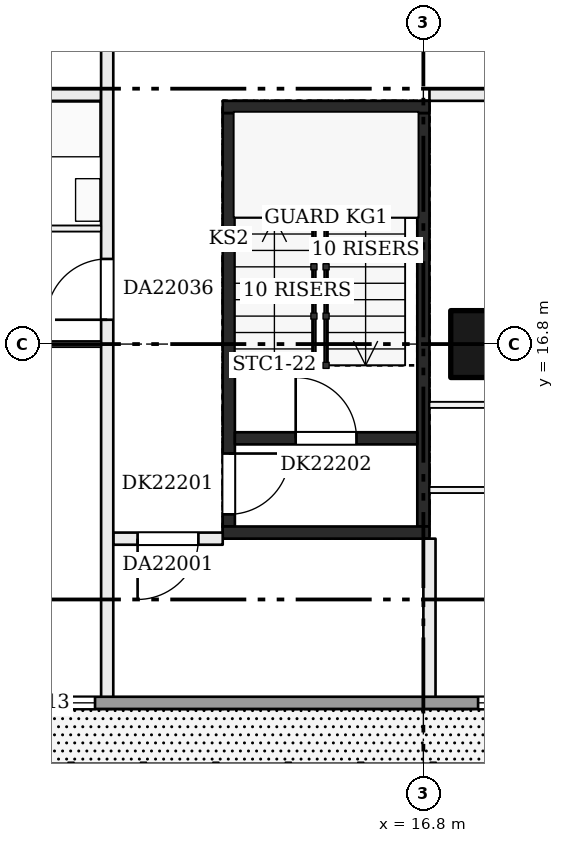
"""IFC4 building model, lengths in metres.
Left out: names, types, materials, properties, quantities, classifications, styles, units other than length and angle.
Written with IfcOpenShell. Run it as: python <this file> out.ifc"""

import sys

from ifc_helpers import new_model, si_unit, direction, frame, frame_2d, origin, origin_2d, place, context, subcontext, project, spatial, rectangle, extrude, element, fill, save


model = new_model("IFC4")
c1 = context("Model", 3, precision=1e-05, world=origin(), true_north=direction((0.0, 1.0)))
c2 = subcontext(c1, "Body", "Model", "MODEL_VIEW")
j1 = project(units=[si_unit("LENGTHUNIT", "METRE"), si_unit("PLANEANGLEUNIT", "RADIAN")], contexts=[c1])
p1 = place(None, origin())
s1 = spatial("IfcSite", under=j1, at=p1, CompositionType="ELEMENT")
p2 = place(p1, origin())
s2 = spatial("IfcBuilding", under=s1, at=p2, CompositionType="ELEMENT")
p3 = place(p2, frame((0.0, 0.0, 91.7)))
s3 = spatial("IfcBuildingStorey", under=s2, at=p3, CompositionType="ELEMENT", Elevation=91.7)
p4 = place(p3, frame((17.8, 16.8, 0.0), z_axis=(0.0, 0.0, 1.0), x_axis=(1.0, 0.0, 0.0)))
e1 = element("IfcColumn", 1, at=p4, inside=s3, PredefinedType="COLUMN", context=c2, shape_type="SweptSolid", body=[
    extrude(rectangle(XDim=1.1, YDim=1.1, at=origin_2d()), origin(), (0.0, 0.0, 1.0), 3.22),
])
p5 = place(p3, frame((13.6, 13.8, 0.0), z_axis=(0.0, 0.0, 1.0), x_axis=(0.0, 1.0, 0.0)))
e2 = element("IfcWall", 2, at=p5, inside=s3, PredefinedType="SHEAR", context=c2, shape_type="SweptSolid", body=[
    extrude(rectangle(XDim=6.8, YDim=0.2, at=frame_2d((3.4, 0.0))), origin(), (0.0, 0.0, 1.0), 3.22),
])
p6 = place(p5, frame((0.2, 0.0, 0.0)))
e3 = element("IfcOpeningElement", 3, at=p6, cuts=e2, PredefinedType="OPENING", context=c2, shape_type="SweptSolid", body=[
    extrude(rectangle(XDim=1.0, YDim=2.1, at=frame_2d((0.5, 1.05))), frame((0.0, 0.11, 0.0), z_axis=(0.0, -1.0, 0.0), x_axis=(1.0, 0.0, 0.0)), (0.0, 0.0, 1.0), 0.22),
])
p7 = place(p3, frame((16.8, 13.8, 0.0), z_axis=(0.0, 0.0, 1.0), x_axis=(0.0, 1.0, 0.0)))
e4 = element("IfcWall", 4, at=p7, inside=s3, PredefinedType="SHEAR", context=c2, shape_type="SweptSolid", body=[
    extrude(rectangle(XDim=6.8, YDim=0.2, at=frame_2d((3.4, 0.0))), origin(), (0.0, 0.0, 1.0), 3.22),
])
for number, where, z_axis, x_axis in (
    (5, (13.5, 13.7, 0.0), (0.0, 0.0, 1.0), (1.0, 0.0, 0.0)),
    (6, (13.5, 20.7, 0.0), (0.0, 0.0, 1.0), (1.0, 0.0, 0.0)),
):
    element("IfcWall", number, at=place(p3, frame(where, z_axis=z_axis, x_axis=x_axis)), inside=s3, PredefinedType="SHEAR", context=c2, shape_type="SweptSolid", body=[
        extrude(rectangle(XDim=3.4, YDim=0.2, at=frame_2d((1.7, 0.0))), origin(), (0.0, 0.0, 1.0), 3.22),
    ])
p8 = place(p3, frame((13.7, 15.25, 0.0), z_axis=(0.0, 0.0, 1.0), x_axis=(1.0, 0.0, 0.0)))
e7 = element("IfcWall", 7, at=p8, inside=s3, PredefinedType="SHEAR", context=c2, shape_type="SweptSolid", body=[
    extrude(rectangle(XDim=3.0, YDim=0.2, at=frame_2d((1.5, 0.0))), origin(), (0.0, 0.0, 1.0), 3.22),
])
p9 = place(p8, frame((1.0, 0.0, 0.0)))
e8 = element("IfcOpeningElement", 8, at=p9, cuts=e7, PredefinedType="OPENING", context=c2, shape_type="SweptSolid", body=[
    extrude(rectangle(XDim=1.0, YDim=2.1, at=frame_2d((0.5, 1.05))), frame((0.0, 0.11, 0.0), z_axis=(0.0, -1.0, 0.0), x_axis=(1.0, 0.0, 0.0)), (0.0, 0.0, 1.0), 0.22),
])
p10 = place(p3, frame((11.7, 13.6, 0.0), z_axis=(0.0, 0.0, 1.0), x_axis=(1.0, 0.0, 0.0)))
e9 = element("IfcWall", 9, at=p10, inside=s3, PredefinedType="PARTITIONING", context=c2, shape_type="SweptSolid", body=[
    extrude(rectangle(XDim=1.8, YDim=0.2, at=frame_2d((0.9, 0.0))), origin(), (0.0, 0.0, 1.0), 3.22),
])
p11 = place(p10, frame((0.4, 0.0, 0.0)))
e10 = element("IfcOpeningElement", 10, at=p11, cuts=e9, PredefinedType="OPENING", context=c2, shape_type="SweptSolid", body=[
    extrude(rectangle(XDim=1.0, YDim=2.1, at=frame_2d((0.5, 1.05))), frame((0.0, 0.11, 0.0), z_axis=(0.0, -1.0, 0.0), x_axis=(1.0, 0.0, 0.0)), (0.0, 0.0, 1.0), 0.22),
])
p12 = place(p3, frame((16.9, 14.4, 0.0), z_axis=(0.0, 0.0, 1.0), x_axis=(1.0, 0.0, 0.0)))
e11 = element("IfcWall", 11, at=p12, inside=s3, PredefinedType="PARTITIONING", context=c2, shape_type="SweptSolid", body=[
    extrude(rectangle(XDim=23.1, YDim=0.1, at=frame_2d((11.55, 0.0))), origin(), (0.0, 0.0, 1.0), 3.22),
])
p13 = place(p12, frame((1.6, 0.0, 0.0)))
e12 = element("IfcOpeningElement", 12, at=p13, cuts=e11, PredefinedType="OPENING", context=c2, shape_type="SweptSolid", body=[
    extrude(rectangle(XDim=0.9, YDim=2.1, at=frame_2d((0.45, 1.05))), frame((0.0, 0.06, 0.0), z_axis=(0.0, -1.0, 0.0), x_axis=(1.0, 0.0, 0.0)), (0.0, 0.0, 1.0), 0.12),
])
p14 = place(p12, frame((7.8, 0.0, 0.0)))
e13 = element("IfcOpeningElement", 13, at=p14, cuts=e11, PredefinedType="OPENING", context=c2, shape_type="SweptSolid", body=[
    extrude(rectangle(XDim=0.9, YDim=2.1, at=frame_2d((0.45, 1.05))), frame((0.0, 0.06, 0.0), z_axis=(0.0, -1.0, 0.0), x_axis=(1.0, 0.0, 0.0)), (0.0, 0.0, 1.0), 0.12),
])
p15 = place(p12, frame((14.1, 0.0, 0.0)))
e14 = element("IfcOpeningElement", 14, at=p15, cuts=e11, PredefinedType="OPENING", context=c2, shape_type="SweptSolid", body=[
    extrude(rectangle(XDim=0.9, YDim=2.1, at=frame_2d((0.45, 1.05))), frame((0.0, 0.06, 0.0), z_axis=(0.0, -1.0, 0.0), x_axis=(1.0, 0.0, 0.0)), (0.0, 0.0, 1.0), 0.12),
])
p16 = place(p12, frame((19.5, 0.0, 0.0)))
e15 = element("IfcOpeningElement", 15, at=p16, cuts=e11, PredefinedType="OPENING", context=c2, shape_type="SweptSolid", body=[
    extrude(rectangle(XDim=0.9, YDim=2.1, at=frame_2d((0.45, 1.05))), frame((0.0, 0.06, 0.0), z_axis=(0.0, -1.0, 0.0), x_axis=(1.0, 0.0, 0.0)), (0.0, 0.0, 1.0), 0.12),
])
p17 = place(p3, frame((16.9, 15.8, 0.0), z_axis=(0.0, 0.0, 1.0), x_axis=(1.0, 0.0, 0.0)))
e16 = element("IfcWall", 16, at=p17, inside=s3, PredefinedType="PARTITIONING", context=c2, shape_type="SweptSolid", body=[
    extrude(rectangle(XDim=23.1, YDim=0.1, at=frame_2d((11.55, 0.0))), origin(), (0.0, 0.0, 1.0), 3.22),
])
p18 = place(p17, frame((1.7, 0.0, 0.0)))
e17 = element("IfcOpeningElement", 17, at=p18, cuts=e16, PredefinedType="OPENING", context=c2, shape_type="SweptSolid", body=[
    extrude(rectangle(XDim=0.9, YDim=2.1, at=frame_2d((0.45, 1.05))), frame((0.0, 0.06, 0.0), z_axis=(0.0, -1.0, 0.0), x_axis=(1.0, 0.0, 0.0)), (0.0, 0.0, 1.0), 0.12),
])
p19 = place(p17, frame((4.314, 0.0, 0.0)))
e18 = element("IfcOpeningElement", 18, at=p19, cuts=e16, PredefinedType="OPENING", context=c2, shape_type="SweptSolid", body=[
    extrude(rectangle(XDim=0.9, YDim=2.1, at=frame_2d((0.45, 1.05))), frame((0.0, 0.06, 0.0), z_axis=(0.0, -1.0, 0.0), x_axis=(1.0, 0.0, 0.0)), (0.0, 0.0, 1.0), 0.12),
])
p20 = place(p17, frame((6.629, 0.0, 0.0)))
e19 = element("IfcOpeningElement", 19, at=p20, cuts=e16, PredefinedType="OPENING", context=c2, shape_type="SweptSolid", body=[
    extrude(rectangle(XDim=0.9, YDim=2.1, at=frame_2d((0.45, 1.05))), frame((0.0, 0.06, 0.0), z_axis=(0.0, -1.0, 0.0), x_axis=(1.0, 0.0, 0.0)), (0.0, 0.0, 1.0), 0.12),
])
p21 = place(p17, frame((10.743, 0.0, 0.0)))
e20 = element("IfcOpeningElement", 20, at=p21, cuts=e16, PredefinedType="OPENING", context=c2, shape_type="SweptSolid", body=[
    extrude(rectangle(XDim=0.9, YDim=2.1, at=frame_2d((0.45, 1.05))), frame((0.0, 0.06, 0.0), z_axis=(0.0, -1.0, 0.0), x_axis=(1.0, 0.0, 0.0)), (0.0, 0.0, 1.0), 0.12),
])
p22 = place(p17, frame((13.957, 0.0, 0.0)))
e21 = element("IfcOpeningElement", 21, at=p22, cuts=e16, PredefinedType="OPENING", context=c2, shape_type="SweptSolid", body=[
    extrude(rectangle(XDim=0.9, YDim=2.1, at=frame_2d((0.45, 1.05))), frame((0.0, 0.06, 0.0), z_axis=(0.0, -1.0, 0.0), x_axis=(1.0, 0.0, 0.0)), (0.0, 0.0, 1.0), 0.12),
])
p23 = place(p17, frame((17.472, 0.0, 0.0)))
e22 = element("IfcOpeningElement", 22, at=p23, cuts=e16, PredefinedType="OPENING", context=c2, shape_type="SweptSolid", body=[
    extrude(rectangle(XDim=0.9, YDim=2.1, at=frame_2d((0.45, 1.05))), frame((0.0, 0.06, 0.0), z_axis=(0.0, -1.0, 0.0), x_axis=(1.0, 0.0, 0.0)), (0.0, 0.0, 1.0), 0.12),
])
p24 = place(p17, frame((20.986, 0.0, 0.0)))
e23 = element("IfcOpeningElement", 23, at=p24, cuts=e16, PredefinedType="OPENING", context=c2, shape_type="SweptSolid", body=[
    extrude(rectangle(XDim=0.9, YDim=2.1, at=frame_2d((0.45, 1.05))), frame((0.0, 0.06, 0.0), z_axis=(0.0, -1.0, 0.0), x_axis=(1.0, 0.0, 0.0)), (0.0, 0.0, 1.0), 0.12),
])
p25 = place(p3, frame((9.0, 16.8, 0.0), z_axis=(0.0, 0.0, 1.0), x_axis=(1.0, 0.0, 0.0)))
e24 = element("IfcWall", 24, at=p25, inside=s3, PredefinedType="PARTITIONING", context=c2, shape_type="SweptSolid", body=[
    extrude(rectangle(XDim=2.5, YDim=0.1, at=frame_2d((1.25, 0.0))), origin(), (0.0, 0.0, 1.0), 3.22),
])
p26 = place(p25, frame((0.5, 0.0, 0.0)))
e25 = element("IfcOpeningElement", 25, at=p26, cuts=e24, PredefinedType="OPENING", context=c2, shape_type="SweptSolid", body=[
    extrude(rectangle(XDim=0.9, YDim=2.1, at=frame_2d((0.45, 1.05))), frame((0.0, 0.06, 0.0), z_axis=(0.0, -1.0, 0.0), x_axis=(1.0, 0.0, 0.0)), (0.0, 0.0, 1.0), 0.12),
])
p27 = place(p3, frame((8.25, 18.7, 0.0), z_axis=(0.0, 0.0, 1.0), x_axis=(1.0, 0.0, 0.0)))
e26 = element("IfcWall", 26, at=p27, inside=s3, PredefinedType="PARTITIONING", context=c2, shape_type="SweptSolid", body=[
    extrude(rectangle(XDim=3.25, YDim=0.1, at=frame_2d((1.625, 0.0))), origin(), (0.0, 0.0, 1.0), 3.22),
])
p28 = place(p3, frame((2.5, 20.9, 0.0), z_axis=(0.0, 0.0, 1.0), x_axis=(1.0, 0.0, 0.0)))
e27 = element("IfcWall", 27, at=p28, inside=s3, PredefinedType="PARTITIONING", context=c2, shape_type="SweptSolid", body=[
    extrude(rectangle(XDim=9.0, YDim=0.2, at=frame_2d((4.5, 0.0))), origin(), (0.0, 0.0, 1.0), 3.22),
])
p29 = place(p3, frame((16.9, 20.9, 0.0), z_axis=(0.0, 0.0, 1.0), x_axis=(1.0, 0.0, 0.0)))
e28 = element("IfcWall", 28, at=p29, inside=s3, PredefinedType="PARTITIONING", context=c2, shape_type="SweptSolid", body=[
    extrude(rectangle(XDim=23.3, YDim=0.2, at=frame_2d((11.65, 0.0))), origin(), (0.0, 0.0, 1.0), 3.22),
])
p30 = place(p29, frame((1.2, 0.0, 0.0)))
e29 = element("IfcOpeningElement", 29, at=p30, cuts=e28, PredefinedType="OPENING", context=c2, shape_type="SweptSolid", body=[
    extrude(rectangle(XDim=1.0, YDim=2.1, at=frame_2d((0.5, 1.05))), frame((0.0, 0.11, 0.0), z_axis=(0.0, -1.0, 0.0), x_axis=(1.0, 0.0, 0.0)), (0.0, 0.0, 1.0), 0.22),
])
p31 = place(p3, frame((11.6, 10.9, 0.0), z_axis=(0.0, 0.0, 1.0), x_axis=(0.0, 1.0, 0.0)))
e30 = element("IfcWall", 30, at=p31, inside=s3, PredefinedType="PARTITIONING", context=c2, shape_type="SweptSolid", body=[
    extrude(rectangle(XDim=31.1, YDim=0.2, at=frame_2d((15.55, 0.0))), origin(), (0.0, 0.0, 1.0), 3.22),
])
p32 = place(p31, frame((6.3, 0.0, 0.0)))
e31 = element("IfcOpeningElement", 31, at=p32, cuts=e30, PredefinedType="OPENING", context=c2, shape_type="SweptSolid", body=[
    extrude(rectangle(XDim=1.0, YDim=2.1, at=frame_2d((0.5, 1.05))), frame((0.0, 0.11, 0.0), z_axis=(0.0, -1.0, 0.0), x_axis=(1.0, 0.0, 0.0)), (0.0, 0.0, 1.0), 0.22),
])
p33 = place(p31, frame((10.8, 0.0, 0.0)))
e32 = element("IfcOpeningElement", 32, at=p33, cuts=e30, PredefinedType="OPENING", context=c2, shape_type="SweptSolid", body=[
    extrude(rectangle(XDim=1.0, YDim=2.1, at=frame_2d((0.5, 1.05))), frame((0.0, 0.11, 0.0), z_axis=(0.0, -1.0, 0.0), x_axis=(1.0, 0.0, 0.0)), (0.0, 0.0, 1.0), 0.22),
])
p34 = place(p3, frame((16.9, 10.9, 0.0), z_axis=(0.0, 0.0, 1.0), x_axis=(0.0, 1.0, 0.0)))
e33 = element("IfcWall", 33, at=p34, inside=s3, PredefinedType="PARTITIONING", context=c2, shape_type="SweptSolid", body=[
    extrude(rectangle(XDim=2.7, YDim=0.2, at=frame_2d((1.35, 0.0))), origin(), (0.0, 0.0, 1.0), 3.22),
])
p35 = place(p3, frame((4.8, 10.9, 0.0), z_axis=(0.0, 0.0, 1.0), x_axis=(1.0, 0.0, 0.0)))
e34 = element("IfcWall", 34, at=p35, inside=s3, PredefinedType="SOLIDWALL", context=c2, shape_type="SweptSolid", body=[
    extrude(rectangle(XDim=37.2, YDim=0.2, at=frame_2d((18.6, 0.0))), origin(), (0.0, 0.0, 1.0), 3.22),
])
p36 = place(p35, frame((0.3, 0.0, 0.9)))
e35 = element("IfcOpeningElement", 35, at=p36, cuts=e34, PredefinedType="OPENING", context=c2, shape_type="SweptSolid", body=[
    extrude(rectangle(XDim=2.4, YDim=1.5, at=frame_2d((1.2, 0.75))), frame((0.0, 0.11, 0.0), z_axis=(0.0, -1.0, 0.0), x_axis=(1.0, 0.0, 0.0)), (0.0, 0.0, 1.0), 0.22),
])
p37 = place(p35, frame((4.2, 0.0, 0.9)))
e36 = element("IfcOpeningElement", 36, at=p37, cuts=e34, PredefinedType="OPENING", context=c2, shape_type="SweptSolid", body=[
    extrude(rectangle(XDim=2.4, YDim=1.5, at=frame_2d((1.2, 0.75))), frame((0.0, 0.11, 0.0), z_axis=(0.0, -1.0, 0.0), x_axis=(1.0, 0.0, 0.0)), (0.0, 0.0, 1.0), 0.22),
])
p38 = place(p35, frame((12.9, 0.0, 0.9)))
e37 = element("IfcOpeningElement", 37, at=p38, cuts=e34, PredefinedType="OPENING", context=c2, shape_type="SweptSolid", body=[
    extrude(rectangle(XDim=2.4, YDim=1.5, at=frame_2d((1.2, 0.75))), frame((0.0, 0.11, 0.0), z_axis=(0.0, -1.0, 0.0), x_axis=(1.0, 0.0, 0.0)), (0.0, 0.0, 1.0), 0.22),
])
p39 = place(p35, frame((17.1, 0.0, 0.0)))
e38 = element("IfcOpeningElement", 38, at=p39, cuts=e34, PredefinedType="OPENING", context=c2, shape_type="SweptSolid", body=[
    extrude(rectangle(XDim=2.4, YDim=2.2, at=frame_2d((1.2, 1.1))), frame((0.0, 0.11, 0.0), z_axis=(0.0, -1.0, 0.0), x_axis=(1.0, 0.0, 0.0)), (0.0, 0.0, 1.0), 0.22),
])
p40 = place(p35, frame((21.3, 0.0, 0.0)))
e39 = element("IfcOpeningElement", 39, at=p40, cuts=e34, PredefinedType="OPENING", context=c2, shape_type="SweptSolid", body=[
    extrude(rectangle(XDim=2.4, YDim=2.2, at=frame_2d((1.2, 1.1))), frame((0.0, 0.11, 0.0), z_axis=(0.0, -1.0, 0.0), x_axis=(1.0, 0.0, 0.0)), (0.0, 0.0, 1.0), 0.22),
])
p41 = place(p35, frame((25.5, 0.0, 0.9)))
e40 = element("IfcOpeningElement", 40, at=p41, cuts=e34, PredefinedType="OPENING", context=c2, shape_type="SweptSolid", body=[
    extrude(rectangle(XDim=2.4, YDim=1.5, at=frame_2d((1.2, 0.75))), frame((0.0, 0.11, 0.0), z_axis=(0.0, -1.0, 0.0), x_axis=(1.0, 0.0, 0.0)), (0.0, 0.0, 1.0), 0.22),
])
p42 = place(p35, frame((29.7, 0.0, 0.9)))
e41 = element("IfcOpeningElement", 41, at=p42, cuts=e34, PredefinedType="OPENING", context=c2, shape_type="SweptSolid", body=[
    extrude(rectangle(XDim=2.4, YDim=1.5, at=frame_2d((1.2, 0.75))), frame((0.0, 0.11, 0.0), z_axis=(0.0, -1.0, 0.0), x_axis=(1.0, 0.0, 0.0)), (0.0, 0.0, 1.0), 0.22),
])
p43 = place(p35, frame((33.9, 0.0, 0.9)))
e42 = element("IfcOpeningElement", 42, at=p43, cuts=e34, PredefinedType="OPENING", context=c2, shape_type="SweptSolid", body=[
    extrude(rectangle(XDim=1.3, YDim=1.5, at=frame_2d((0.65, 0.75))), frame((0.0, 0.11, 0.0), z_axis=(0.0, -1.0, 0.0), x_axis=(1.0, 0.0, 0.0)), (0.0, 0.0, 1.0), 0.22),
])
p44 = place(p6, frame((1.0, 0.0, 0.0), z_axis=(0.0, 0.0, 1.0), x_axis=(-1.0, 0.0, 0.0)))
e43 = element("IfcDoor", 43, at=p44, inside=s3, OperationType="SINGLE_SWING_LEFT", PredefinedType="DOOR", context=c2, shape_type="SweptSolid", body=[
    extrude(rectangle(XDim=1.0, YDim=2.1, at=frame_2d((0.5, 1.05))), frame((0.0, 0.025, 0.0), z_axis=(0.0, -1.0, 0.0), x_axis=(1.0, 0.0, 0.0)), (0.0, 0.0, 1.0), 0.05),
])
fill(e3, e43)
p45 = place(p9, origin())
e44 = element("IfcDoor", 44, at=p45, inside=s3, OperationType="SINGLE_SWING_LEFT", PredefinedType="DOOR", context=c2, shape_type="SweptSolid", body=[
    extrude(rectangle(XDim=1.0, YDim=2.1, at=frame_2d((0.5, 1.05))), frame((0.0, 0.025, 0.0), z_axis=(0.0, -1.0, 0.0), x_axis=(1.0, 0.0, 0.0)), (0.0, 0.0, 1.0), 0.05),
])
fill(e8, e44)
p46 = place(p11, frame((1.0, 0.0, 0.0), z_axis=(0.0, 0.0, 1.0), x_axis=(-1.0, 0.0, 0.0)))
e45 = element("IfcDoor", 45, at=p46, inside=s3, OperationType="SINGLE_SWING_RIGHT", PredefinedType="DOOR", context=c2, shape_type="SweptSolid", body=[
    extrude(rectangle(XDim=1.0, YDim=2.1, at=frame_2d((0.5, 1.05))), frame((0.0, 0.025, 0.0), z_axis=(0.0, -1.0, 0.0), x_axis=(1.0, 0.0, 0.0)), (0.0, 0.0, 1.0), 0.05),
])
fill(e10, e45)
p47 = place(p32, origin())
e46 = element("IfcDoor", 46, at=p47, inside=s3, OperationType="SINGLE_SWING_LEFT", PredefinedType="DOOR", context=c2, shape_type="SweptSolid", body=[
    extrude(rectangle(XDim=1.0, YDim=2.1, at=frame_2d((0.5, 1.05))), frame((0.0, 0.025, 0.0), z_axis=(0.0, -1.0, 0.0), x_axis=(1.0, 0.0, 0.0)), (0.0, 0.0, 1.0), 0.05),
])
fill(e31, e46)
p48 = place(p37, origin())
e47 = element("IfcWindow", 47, at=p48, inside=s3, PartitioningType="SINGLE_PANEL", PredefinedType="WINDOW", context=c2, shape_type="SweptSolid", body=[
    extrude(rectangle(XDim=2.4, YDim=1.5, at=frame_2d((1.2, 0.75))), frame((0.0, 0.03, 0.0), z_axis=(0.0, -1.0, 0.0), x_axis=(1.0, 0.0, 0.0)), (0.0, 0.0, 1.0), 0.06),
])
fill(e36, e47)
p49 = place(p38, origin())
e48 = element("IfcWindow", 48, at=p49, inside=s3, PartitioningType="SINGLE_PANEL", PredefinedType="WINDOW", context=c2, shape_type="SweptSolid", body=[
    extrude(rectangle(XDim=2.4, YDim=1.5, at=frame_2d((1.2, 0.75))), frame((0.0, 0.03, 0.0), z_axis=(0.0, -1.0, 0.0), x_axis=(1.0, 0.0, 0.0)), (0.0, 0.0, 1.0), 0.06),
])
fill(e37, e48)
save(model, sys.argv[1])
